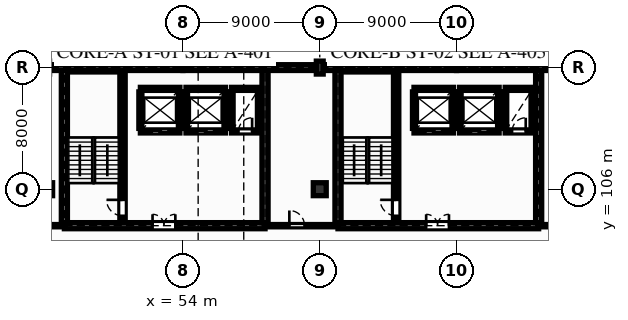
"""IFC4 building model, lengths in metres.
Left out: names, types, materials, properties, quantities, classifications, styles, units other than length and angle.
Written with IfcOpenShell. Run it as: python <this file> out.ifc"""

import sys

from ifc_helpers import new_model, si_unit, direction, frame, frame_2d, origin, origin_2d, place, context, subcontext, project, spatial, rectangle, extrude, element, fill, save


model = new_model("IFC4")
c1 = context("Model", 3, precision=1e-05, world=origin(), true_north=direction((0.0, 1.0)))
c2 = subcontext(c1, "Body", "Model", "MODEL_VIEW")
j1 = project(units=[si_unit("LENGTHUNIT", "METRE"), si_unit("PLANEANGLEUNIT", "RADIAN")], contexts=[c1])
p1 = place(None, origin())
s1 = spatial("IfcSite", under=j1, at=p1, CompositionType="ELEMENT")
p2 = place(p1, origin())
s2 = spatial("IfcBuilding", under=s1, at=p2, CompositionType="ELEMENT")
p3 = place(p2, frame((0.0, 0.0, 5.1)))
s3 = spatial("IfcBuildingStorey", under=s2, at=p3, CompositionType="ELEMENT", Elevation=5.1)
p4 = place(p3, frame((45.0, 106.0, 0.0), z_axis=(0.0, 0.0, 1.0), x_axis=(1.0, 0.0, 0.0)))
e1 = element("IfcColumn", 1, at=p4, inside=s3, PredefinedType="COLUMN", context=c2, shape_type="SweptSolid", body=[
    extrude(rectangle(XDim=0.85, YDim=0.85, at=origin_2d()), origin(), (0.0, 0.0, 1.0), 3.84),
])
p5 = place(p3, frame((45.0, 114.0, 0.0), z_axis=(0.0, 0.0, 1.0), x_axis=(0.0, 1.0, 0.0)))
e2 = element("IfcColumn", 2, at=p5, inside=s3, PredefinedType="COLUMN", context=c2, shape_type="SweptSolid", body=[
    extrude(rectangle(XDim=0.45, YDim=0.85, at=origin_2d()), origin(), (0.0, 0.0, 1.0), 3.84),
])
p6 = place(p3, frame((63.0, 106.0, 0.0), z_axis=(0.0, 0.0, 1.0), x_axis=(1.0, 0.0, 0.0)))
e3 = element("IfcColumn", 3, at=p6, inside=s3, PredefinedType="COLUMN", context=c2, shape_type="SweptSolid", body=[
    extrude(rectangle(XDim=0.85, YDim=0.85, at=origin_2d()), origin(), (0.0, 0.0, 1.0), 3.84),
])
p7 = place(p3, frame((63.0, 114.0, 0.0), z_axis=(0.0, 0.0, 1.0), x_axis=(0.0, 1.0, 0.0)))
e4 = element("IfcColumn", 4, at=p7, inside=s3, PredefinedType="COLUMN", context=c2, shape_type="SweptSolid", body=[
    extrude(rectangle(XDim=0.45, YDim=0.85, at=origin_2d()), origin(), (0.0, 0.0, 1.0), 3.84),
])
for number, where, z_axis, x_axis in (
    (5, (45.0, 114.0, 0.0), (0.0, 0.0, 1.0), (1.0, 0.0, 0.0)),
    (6, (54.0, 114.0, 0.0), (0.0, 0.0, 1.0), (1.0, 0.0, 0.0)),
    (7, (63.0, 114.0, 0.0), (0.0, 0.0, 1.0), (1.0, 0.0, 0.0)),
    (8, (72.0, 114.0, 0.0), (0.0, 0.0, 1.0), (1.0, 0.0, 0.0)),
):
    element("IfcWall", number, at=place(p3, frame(where, z_axis=z_axis, x_axis=x_axis)), inside=s3, PredefinedType="SOLIDWALL", context=c2, shape_type="SweptSolid", body=[
        extrude(rectangle(XDim=9.0, YDim=0.38, at=frame_2d((4.5, 0.0))), origin(), (0.0, 0.0, 1.0), 3.55),
    ])
p8 = place(p3, frame((46.2, 103.6, 0.0), z_axis=(0.0, 0.0, 1.0), x_axis=(1.0, 0.0, 0.0)))
e9 = element("IfcWall", 9, at=p8, inside=s3, PredefinedType="SHEAR", context=c2, shape_type="SweptSolid", body=[
    extrude(rectangle(XDim=13.2, YDim=0.4, at=frame_2d((6.6, 0.0))), origin(), (0.0, 0.0, 1.0), 3.55),
])
p9 = place(p8, frame((5.8, 0.0, 0.0)))
e10 = element("IfcOpeningElement", 10, at=p9, cuts=e9, PredefinedType="OPENING", context=c2, shape_type="SweptSolid", body=[
    extrude(rectangle(XDim=1.5, YDim=2.2, at=frame_2d((0.75, 1.1))), frame((0.0, 0.21, 0.0), z_axis=(0.0, -1.0, 0.0), x_axis=(1.0, 0.0, 0.0)), (0.0, 0.0, 1.0), 0.42),
])
for number, where, z_axis, x_axis in (
    (11, (46.2, 103.8, 0.0), (0.0, 0.0, 1.0), (0.0, 1.0, 0.0)),
    (12, (59.4, 103.8, 0.0), (0.0, 0.0, 1.0), (0.0, 1.0, 0.0)),
):
    element("IfcWall", number, at=place(p3, frame(where, z_axis=z_axis, x_axis=x_axis)), inside=s3, PredefinedType="SHEAR", context=c2, shape_type="SweptSolid", body=[
        extrude(rectangle(XDim=10.01, YDim=0.4, at=frame_2d((5.005, 0.0))), origin(), (0.0, 0.0, 1.0), 3.55),
    ])
p10 = place(p3, frame((50.025, 103.8, 0.0), z_axis=(0.0, 0.0, 1.0), x_axis=(0.0, 1.0, 0.0)))
e13 = element("IfcWall", 13, at=p10, inside=s3, PredefinedType="SHEAR", context=c2, shape_type="SweptSolid", body=[
    extrude(rectangle(XDim=10.01, YDim=0.35, at=frame_2d((5.005, 0.0))), origin(), (0.0, 0.0, 1.0), 3.55),
])
p11 = place(p10, frame((0.45, 0.0, 0.0)))
e14 = element("IfcOpeningElement", 14, at=p11, cuts=e13, PredefinedType="OPENING", context=c2, shape_type="SweptSolid", body=[
    extrude(rectangle(XDim=1.05, YDim=2.2, at=frame_2d((0.525, 1.1))), frame((0.0, 0.185, 0.0), z_axis=(0.0, -1.0, 0.0), x_axis=(1.0, 0.0, 0.0)), (0.0, 0.0, 1.0), 0.37),
])
p12 = place(p3, frame((51.2, 109.8, 0.0), z_axis=(0.0, 0.0, 1.0), x_axis=(1.0, 0.0, 0.0)))
e15 = element("IfcWall", 15, at=p12, inside=s3, PredefinedType="PARTITIONING", context=c2, shape_type="SweptSolid", body=[
    extrude(rectangle(XDim=2.6, YDim=0.2, at=frame_2d((1.3, 0.0))), origin(), (0.0, 0.0, 1.0), 3.55),
])
p13 = place(p12, frame((0.75, 0.0, 0.0)))
e16 = element("IfcOpeningElement", 16, at=p13, cuts=e15, PredefinedType="OPENING", context=c2, shape_type="SweptSolid", body=[
    extrude(rectangle(XDim=1.1, YDim=2.15, at=frame_2d((0.55, 1.075))), frame((0.0, 0.11, 0.0), z_axis=(0.0, -1.0, 0.0), x_axis=(1.0, 0.0, 0.0)), (0.0, 0.0, 1.0), 0.22),
])
p14 = place(p3, frame((51.2, 112.6, 0.0), z_axis=(0.0, 0.0, 1.0), x_axis=(1.0, 0.0, 0.0)))
e17 = element("IfcWall", 17, at=p14, inside=s3, PredefinedType="PARTITIONING", context=c2, shape_type="SweptSolid", body=[
    extrude(rectangle(XDim=2.6, YDim=0.2, at=frame_2d((1.3, 0.0))), origin(), (0.0, 0.0, 1.0), 3.55),
])
for number, where, z_axis, x_axis in (
    (18, (51.2, 110.0, 0.0), (0.0, 0.0, 1.0), (0.0, 1.0, 0.0)),
    (19, (53.8, 110.0, 0.0), (0.0, 0.0, 1.0), (0.0, 1.0, 0.0)),
):
    element("IfcWall", number, at=place(p3, frame(where, z_axis=z_axis, x_axis=x_axis)), inside=s3, PredefinedType="PARTITIONING", context=c2, shape_type="SweptSolid", body=[
        extrude(rectangle(XDim=2.4, YDim=0.2, at=frame_2d((1.2, 0.0))), origin(), (0.0, 0.0, 1.0), 3.55),
    ])
p15 = place(p3, frame((54.2, 109.8, 0.0), z_axis=(0.0, 0.0, 1.0), x_axis=(1.0, 0.0, 0.0)))
e20 = element("IfcWall", 20, at=p15, inside=s3, PredefinedType="PARTITIONING", context=c2, shape_type="SweptSolid", body=[
    extrude(rectangle(XDim=2.6, YDim=0.2, at=frame_2d((1.3, 0.0))), origin(), (0.0, 0.0, 1.0), 3.55),
])
p16 = place(p15, frame((0.75, 0.0, 0.0)))
e21 = element("IfcOpeningElement", 21, at=p16, cuts=e20, PredefinedType="OPENING", context=c2, shape_type="SweptSolid", body=[
    extrude(rectangle(XDim=1.1, YDim=2.15, at=frame_2d((0.55, 1.075))), frame((0.0, 0.11, 0.0), z_axis=(0.0, -1.0, 0.0), x_axis=(1.0, 0.0, 0.0)), (0.0, 0.0, 1.0), 0.22),
])
p17 = place(p3, frame((54.2, 112.6, 0.0), z_axis=(0.0, 0.0, 1.0), x_axis=(1.0, 0.0, 0.0)))
e22 = element("IfcWall", 22, at=p17, inside=s3, PredefinedType="PARTITIONING", context=c2, shape_type="SweptSolid", body=[
    extrude(rectangle(XDim=2.6, YDim=0.2, at=frame_2d((1.3, 0.0))), origin(), (0.0, 0.0, 1.0), 3.55),
])
for number, where, z_axis, x_axis in (
    (23, (54.2, 110.0, 0.0), (0.0, 0.0, 1.0), (0.0, 1.0, 0.0)),
    (24, (56.8, 110.0, 0.0), (0.0, 0.0, 1.0), (0.0, 1.0, 0.0)),
):
    element("IfcWall", number, at=place(p3, frame(where, z_axis=z_axis, x_axis=x_axis)), inside=s3, PredefinedType="PARTITIONING", context=c2, shape_type="SweptSolid", body=[
        extrude(rectangle(XDim=2.4, YDim=0.2, at=frame_2d((1.2, 0.0))), origin(), (0.0, 0.0, 1.0), 3.55),
    ])
p18 = place(p3, frame((57.2, 109.8, 0.0), z_axis=(0.0, 0.0, 1.0), x_axis=(1.0, 0.0, 0.0)))
e25 = element("IfcWall", 25, at=p18, inside=s3, PredefinedType="PARTITIONING", context=c2, shape_type="SweptSolid", body=[
    extrude(rectangle(XDim=1.8, YDim=0.2, at=frame_2d((0.9, 0.0))), origin(), (0.0, 0.0, 1.0), 3.55),
])
p19 = place(p18, frame((0.45, 0.0, 0.0)))
e26 = element("IfcOpeningElement", 26, at=p19, cuts=e25, PredefinedType="OPENING", context=c2, shape_type="SweptSolid", body=[
    extrude(rectangle(XDim=0.9, YDim=2.1, at=frame_2d((0.45, 1.05))), frame((0.0, 0.11, 0.0), z_axis=(0.0, -1.0, 0.0), x_axis=(1.0, 0.0, 0.0)), (0.0, 0.0, 1.0), 0.22),
])
p20 = place(p3, frame((57.2, 112.6, 0.0), z_axis=(0.0, 0.0, 1.0), x_axis=(1.0, 0.0, 0.0)))
e27 = element("IfcWall", 27, at=p20, inside=s3, PredefinedType="PARTITIONING", context=c2, shape_type="SweptSolid", body=[
    extrude(rectangle(XDim=1.8, YDim=0.2, at=frame_2d((0.9, 0.0))), origin(), (0.0, 0.0, 1.0), 3.55),
])
for number, where, z_axis, x_axis in (
    (28, (57.2, 110.0, 0.0), (0.0, 0.0, 1.0), (0.0, 1.0, 0.0)),
    (29, (59.0, 110.0, 0.0), (0.0, 0.0, 1.0), (0.0, 1.0, 0.0)),
):
    element("IfcWall", number, at=place(p3, frame(where, z_axis=z_axis, x_axis=x_axis)), inside=s3, PredefinedType="PARTITIONING", context=c2, shape_type="SweptSolid", body=[
        extrude(rectangle(XDim=2.4, YDim=0.2, at=frame_2d((1.2, 0.0))), origin(), (0.0, 0.0, 1.0), 3.55),
    ])
p21 = place(p3, frame((64.2, 103.6, 0.0), z_axis=(0.0, 0.0, 1.0), x_axis=(1.0, 0.0, 0.0)))
e30 = element("IfcWall", 30, at=p21, inside=s3, PredefinedType="SHEAR", context=c2, shape_type="SweptSolid", body=[
    extrude(rectangle(XDim=13.2, YDim=0.4, at=frame_2d((6.6, 0.0))), origin(), (0.0, 0.0, 1.0), 3.55),
])
p22 = place(p21, frame((5.8, 0.0, 0.0)))
e31 = element("IfcOpeningElement", 31, at=p22, cuts=e30, PredefinedType="OPENING", context=c2, shape_type="SweptSolid", body=[
    extrude(rectangle(XDim=1.5, YDim=2.2, at=frame_2d((0.75, 1.1))), frame((0.0, 0.21, 0.0), z_axis=(0.0, -1.0, 0.0), x_axis=(1.0, 0.0, 0.0)), (0.0, 0.0, 1.0), 0.42),
])
for number, where, z_axis, x_axis in (
    (32, (64.2, 103.8, 0.0), (0.0, 0.0, 1.0), (0.0, 1.0, 0.0)),
    (33, (77.4, 103.8, 0.0), (0.0, 0.0, 1.0), (0.0, 1.0, 0.0)),
):
    element("IfcWall", number, at=place(p3, frame(where, z_axis=z_axis, x_axis=x_axis)), inside=s3, PredefinedType="SHEAR", context=c2, shape_type="SweptSolid", body=[
        extrude(rectangle(XDim=10.01, YDim=0.4, at=frame_2d((5.005, 0.0))), origin(), (0.0, 0.0, 1.0), 3.55),
    ])
p23 = place(p3, frame((68.025, 103.8, 0.0), z_axis=(0.0, 0.0, 1.0), x_axis=(0.0, 1.0, 0.0)))
e34 = element("IfcWall", 34, at=p23, inside=s3, PredefinedType="SHEAR", context=c2, shape_type="SweptSolid", body=[
    extrude(rectangle(XDim=10.01, YDim=0.35, at=frame_2d((5.005, 0.0))), origin(), (0.0, 0.0, 1.0), 3.55),
])
p24 = place(p23, frame((0.45, 0.0, 0.0)))
e35 = element("IfcOpeningElement", 35, at=p24, cuts=e34, PredefinedType="OPENING", context=c2, shape_type="SweptSolid", body=[
    extrude(rectangle(XDim=1.05, YDim=2.2, at=frame_2d((0.525, 1.1))), frame((0.0, 0.185, 0.0), z_axis=(0.0, -1.0, 0.0), x_axis=(1.0, 0.0, 0.0)), (0.0, 0.0, 1.0), 0.37),
])
p25 = place(p3, frame((69.2, 109.8, 0.0), z_axis=(0.0, 0.0, 1.0), x_axis=(1.0, 0.0, 0.0)))
e36 = element("IfcWall", 36, at=p25, inside=s3, PredefinedType="PARTITIONING", context=c2, shape_type="SweptSolid", body=[
    extrude(rectangle(XDim=2.6, YDim=0.2, at=frame_2d((1.3, 0.0))), origin(), (0.0, 0.0, 1.0), 3.55),
])
p26 = place(p25, frame((0.75, 0.0, 0.0)))
e37 = element("IfcOpeningElement", 37, at=p26, cuts=e36, PredefinedType="OPENING", context=c2, shape_type="SweptSolid", body=[
    extrude(rectangle(XDim=1.1, YDim=2.15, at=frame_2d((0.55, 1.075))), frame((0.0, 0.11, 0.0), z_axis=(0.0, -1.0, 0.0), x_axis=(1.0, 0.0, 0.0)), (0.0, 0.0, 1.0), 0.22),
])
p27 = place(p3, frame((69.2, 112.6, 0.0), z_axis=(0.0, 0.0, 1.0), x_axis=(1.0, 0.0, 0.0)))
e38 = element("IfcWall", 38, at=p27, inside=s3, PredefinedType="PARTITIONING", context=c2, shape_type="SweptSolid", body=[
    extrude(rectangle(XDim=2.6, YDim=0.2, at=frame_2d((1.3, 0.0))), origin(), (0.0, 0.0, 1.0), 3.55),
])
for number, where, z_axis, x_axis in (
    (39, (69.2, 110.0, 0.0), (0.0, 0.0, 1.0), (0.0, 1.0, 0.0)),
    (40, (71.8, 110.0, 0.0), (0.0, 0.0, 1.0), (0.0, 1.0, 0.0)),
):
    element("IfcWall", number, at=place(p3, frame(where, z_axis=z_axis, x_axis=x_axis)), inside=s3, PredefinedType="PARTITIONING", context=c2, shape_type="SweptSolid", body=[
        extrude(rectangle(XDim=2.4, YDim=0.2, at=frame_2d((1.2, 0.0))), origin(), (0.0, 0.0, 1.0), 3.55),
    ])
p28 = place(p3, frame((72.2, 109.8, 0.0), z_axis=(0.0, 0.0, 1.0), x_axis=(1.0, 0.0, 0.0)))
e41 = element("IfcWall", 41, at=p28, inside=s3, PredefinedType="PARTITIONING", context=c2, shape_type="SweptSolid", body=[
    extrude(rectangle(XDim=2.6, YDim=0.2, at=frame_2d((1.3, 0.0))), origin(), (0.0, 0.0, 1.0), 3.55),
])
p29 = place(p28, frame((0.75, 0.0, 0.0)))
e42 = element("IfcOpeningElement", 42, at=p29, cuts=e41, PredefinedType="OPENING", context=c2, shape_type="SweptSolid", body=[
    extrude(rectangle(XDim=1.1, YDim=2.15, at=frame_2d((0.55, 1.075))), frame((0.0, 0.11, 0.0), z_axis=(0.0, -1.0, 0.0), x_axis=(1.0, 0.0, 0.0)), (0.0, 0.0, 1.0), 0.22),
])
p30 = place(p3, frame((72.2, 112.6, 0.0), z_axis=(0.0, 0.0, 1.0), x_axis=(1.0, 0.0, 0.0)))
e43 = element("IfcWall", 43, at=p30, inside=s3, PredefinedType="PARTITIONING", context=c2, shape_type="SweptSolid", body=[
    extrude(rectangle(XDim=2.6, YDim=0.2, at=frame_2d((1.3, 0.0))), origin(), (0.0, 0.0, 1.0), 3.55),
])
for number, where, z_axis, x_axis in (
    (44, (72.2, 110.0, 0.0), (0.0, 0.0, 1.0), (0.0, 1.0, 0.0)),
    (45, (74.8, 110.0, 0.0), (0.0, 0.0, 1.0), (0.0, 1.0, 0.0)),
):
    element("IfcWall", number, at=place(p3, frame(where, z_axis=z_axis, x_axis=x_axis)), inside=s3, PredefinedType="PARTITIONING", context=c2, shape_type="SweptSolid", body=[
        extrude(rectangle(XDim=2.4, YDim=0.2, at=frame_2d((1.2, 0.0))), origin(), (0.0, 0.0, 1.0), 3.55),
    ])
p31 = place(p3, frame((75.2, 109.8, 0.0), z_axis=(0.0, 0.0, 1.0), x_axis=(1.0, 0.0, 0.0)))
e46 = element("IfcWall", 46, at=p31, inside=s3, PredefinedType="PARTITIONING", context=c2, shape_type="SweptSolid", body=[
    extrude(rectangle(XDim=1.8, YDim=0.2, at=frame_2d((0.9, 0.0))), origin(), (0.0, 0.0, 1.0), 3.55),
])
p32 = place(p31, frame((0.45, 0.0, 0.0)))
e47 = element("IfcOpeningElement", 47, at=p32, cuts=e46, PredefinedType="OPENING", context=c2, shape_type="SweptSolid", body=[
    extrude(rectangle(XDim=0.9, YDim=2.1, at=frame_2d((0.45, 1.05))), frame((0.0, 0.11, 0.0), z_axis=(0.0, -1.0, 0.0), x_axis=(1.0, 0.0, 0.0)), (0.0, 0.0, 1.0), 0.22),
])
p33 = place(p3, frame((75.2, 112.6, 0.0), z_axis=(0.0, 0.0, 1.0), x_axis=(1.0, 0.0, 0.0)))
e48 = element("IfcWall", 48, at=p33, inside=s3, PredefinedType="PARTITIONING", context=c2, shape_type="SweptSolid", body=[
    extrude(rectangle(XDim=1.8, YDim=0.2, at=frame_2d((0.9, 0.0))), origin(), (0.0, 0.0, 1.0), 3.55),
])
for number, where, z_axis, x_axis in (
    (49, (75.2, 110.0, 0.0), (0.0, 0.0, 1.0), (0.0, 1.0, 0.0)),
    (50, (77.0, 110.0, 0.0), (0.0, 0.0, 1.0), (0.0, 1.0, 0.0)),
):
    element("IfcWall", number, at=place(p3, frame(where, z_axis=z_axis, x_axis=x_axis)), inside=s3, PredefinedType="PARTITIONING", context=c2, shape_type="SweptSolid", body=[
        extrude(rectangle(XDim=2.4, YDim=0.2, at=frame_2d((1.2, 0.0))), origin(), (0.0, 0.0, 1.0), 3.55),
    ])
p34 = place(p3, frame((36.0, 103.6, 0.0), z_axis=(0.0, 0.0, 1.0), x_axis=(1.0, 0.0, 0.0)))
e51 = element("IfcWall", 51, at=p34, inside=s3, PredefinedType="PARTITIONING", context=c2, shape_type="SweptSolid", body=[
    extrude(rectangle(XDim=10.2, YDim=0.15, at=frame_2d((5.1, 0.0))), origin(), (0.0, 0.0, 1.0), 3.55),
])
p35 = place(p34, frame((4.4, 0.0, 0.0)))
e52 = element("IfcOpeningElement", 52, at=p35, cuts=e51, PredefinedType="OPENING", context=c2, shape_type="SweptSolid", body=[
    extrude(rectangle(XDim=1.0, YDim=2.15, at=frame_2d((0.5, 1.075))), frame((0.0, 0.085, 0.0), z_axis=(0.0, -1.0, 0.0), x_axis=(1.0, 0.0, 0.0)), (0.0, 0.0, 1.0), 0.17),
])
p36 = place(p3, frame((59.4, 103.6, 0.0), z_axis=(0.0, 0.0, 1.0), x_axis=(1.0, 0.0, 0.0)))
e53 = element("IfcWall", 53, at=p36, inside=s3, PredefinedType="PARTITIONING", context=c2, shape_type="SweptSolid", body=[
    extrude(rectangle(XDim=4.8, YDim=0.15, at=frame_2d((2.4, 0.0))), origin(), (0.0, 0.0, 1.0), 3.55),
])
p37 = place(p36, frame((1.6, 0.0, 0.0)))
e54 = element("IfcOpeningElement", 54, at=p37, cuts=e53, PredefinedType="OPENING", context=c2, shape_type="SweptSolid", body=[
    extrude(rectangle(XDim=1.0, YDim=2.15, at=frame_2d((0.5, 1.075))), frame((0.0, 0.085, 0.0), z_axis=(0.0, -1.0, 0.0), x_axis=(1.0, 0.0, 0.0)), (0.0, 0.0, 1.0), 0.17),
])
p38 = place(p3, frame((77.4, 103.6, 0.0), z_axis=(0.0, 0.0, 1.0), x_axis=(1.0, 0.0, 0.0)))
e55 = element("IfcWall", 55, at=p38, inside=s3, PredefinedType="PARTITIONING", context=c2, shape_type="SweptSolid", body=[
    extrude(rectangle(XDim=30.6, YDim=0.15, at=frame_2d((15.3, 0.0))), origin(), (0.0, 0.0, 1.0), 3.55),
])
p39 = place(p38, frame((14.6, 0.0, 0.0)))
e56 = element("IfcOpeningElement", 56, at=p39, cuts=e55, PredefinedType="OPENING", context=c2, shape_type="SweptSolid", body=[
    extrude(rectangle(XDim=1.0, YDim=2.15, at=frame_2d((0.5, 1.075))), frame((0.0, 0.085, 0.0), z_axis=(0.0, -1.0, 0.0), x_axis=(1.0, 0.0, 0.0)), (0.0, 0.0, 1.0), 0.17),
])
p40 = place(p9, origin())
e57 = element("IfcDoor", 57, at=p40, inside=s3, OperationType="DOUBLE_DOOR_SINGLE_SWING", PredefinedType="DOOR", context=c2, shape_type="SweptSolid", body=[
    extrude(rectangle(XDim=1.5, YDim=2.2, at=frame_2d((0.75, 1.1))), frame((0.0, 0.025, 0.0), z_axis=(0.0, -1.0, 0.0), x_axis=(1.0, 0.0, 0.0)), (0.0, 0.0, 1.0), 0.05),
])
fill(e10, e57)
p41 = place(p11, origin())
e58 = element("IfcDoor", 58, at=p41, inside=s3, OperationType="SINGLE_SWING_RIGHT", PredefinedType="DOOR", context=c2, shape_type="SweptSolid", body=[
    extrude(rectangle(XDim=1.05, YDim=2.2, at=frame_2d((0.525, 1.1))), frame((0.0, 0.025, 0.0), z_axis=(0.0, -1.0, 0.0), x_axis=(1.0, 0.0, 0.0)), (0.0, 0.0, 1.0), 0.05),
])
fill(e14, e58)
p42 = place(p13, origin())
e59 = element("IfcDoor", 59, at=p42, inside=s3, OperationType="SLIDING_TO_LEFT", PredefinedType="DOOR", context=c2, shape_type="SweptSolid", body=[
    extrude(rectangle(XDim=1.1, YDim=2.15, at=frame_2d((0.55, 1.075))), frame((0.0, 0.025, 0.0), z_axis=(0.0, -1.0, 0.0), x_axis=(1.0, 0.0, 0.0)), (0.0, 0.0, 1.0), 0.05),
])
fill(e16, e59)
p43 = place(p16, origin())
e60 = element("IfcDoor", 60, at=p43, inside=s3, OperationType="SLIDING_TO_RIGHT", PredefinedType="DOOR", context=c2, shape_type="SweptSolid", body=[
    extrude(rectangle(XDim=1.1, YDim=2.15, at=frame_2d((0.55, 1.075))), frame((0.0, 0.025, 0.0), z_axis=(0.0, -1.0, 0.0), x_axis=(1.0, 0.0, 0.0)), (0.0, 0.0, 1.0), 0.05),
])
fill(e21, e60)
p44 = place(p19, origin())
e61 = element("IfcDoor", 61, at=p44, inside=s3, OperationType="SINGLE_SWING_RIGHT", PredefinedType="DOOR", context=c2, shape_type="SweptSolid", body=[
    extrude(rectangle(XDim=0.9, YDim=2.1, at=frame_2d((0.45, 1.05))), frame((0.0, 0.025, 0.0), z_axis=(0.0, -1.0, 0.0), x_axis=(1.0, 0.0, 0.0)), (0.0, 0.0, 1.0), 0.05),
])
fill(e26, e61)
p45 = place(p22, origin())
e62 = element("IfcDoor", 62, at=p45, inside=s3, OperationType="DOUBLE_DOOR_SINGLE_SWING", PredefinedType="DOOR", context=c2, shape_type="SweptSolid", body=[
    extrude(rectangle(XDim=1.5, YDim=2.2, at=frame_2d((0.75, 1.1))), frame((0.0, 0.025, 0.0), z_axis=(0.0, -1.0, 0.0), x_axis=(1.0, 0.0, 0.0)), (0.0, 0.0, 1.0), 0.05),
])
fill(e31, e62)
p46 = place(p24, origin())
e63 = element("IfcDoor", 63, at=p46, inside=s3, OperationType="SINGLE_SWING_RIGHT", PredefinedType="DOOR", context=c2, shape_type="SweptSolid", body=[
    extrude(rectangle(XDim=1.05, YDim=2.2, at=frame_2d((0.525, 1.1))), frame((0.0, 0.025, 0.0), z_axis=(0.0, -1.0, 0.0), x_axis=(1.0, 0.0, 0.0)), (0.0, 0.0, 1.0), 0.05),
])
fill(e35, e63)
p47 = place(p26, origin())
e64 = element("IfcDoor", 64, at=p47, inside=s3, OperationType="SLIDING_TO_LEFT", PredefinedType="DOOR", context=c2, shape_type="SweptSolid", body=[
    extrude(rectangle(XDim=1.1, YDim=2.15, at=frame_2d((0.55, 1.075))), frame((0.0, 0.025, 0.0), z_axis=(0.0, -1.0, 0.0), x_axis=(1.0, 0.0, 0.0)), (0.0, 0.0, 1.0), 0.05),
])
fill(e37, e64)
p48 = place(p29, origin())
e65 = element("IfcDoor", 65, at=p48, inside=s3, OperationType="SLIDING_TO_RIGHT", PredefinedType="DOOR", context=c2, shape_type="SweptSolid", body=[
    extrude(rectangle(XDim=1.1, YDim=2.15, at=frame_2d((0.55, 1.075))), frame((0.0, 0.025, 0.0), z_axis=(0.0, -1.0, 0.0), x_axis=(1.0, 0.0, 0.0)), (0.0, 0.0, 1.0), 0.05),
])
fill(e42, e65)
p49 = place(p32, origin())
e66 = element("IfcDoor", 66, at=p49, inside=s3, OperationType="SINGLE_SWING_RIGHT", PredefinedType="DOOR", context=c2, shape_type="SweptSolid", body=[
    extrude(rectangle(XDim=0.9, YDim=2.1, at=frame_2d((0.45, 1.05))), frame((0.0, 0.025, 0.0), z_axis=(0.0, -1.0, 0.0), x_axis=(1.0, 0.0, 0.0)), (0.0, 0.0, 1.0), 0.05),
])
fill(e47, e66)
p50 = place(p37, origin())
e67 = element("IfcDoor", 67, at=p50, inside=s3, OperationType="SINGLE_SWING_LEFT", PredefinedType="DOOR", context=c2, shape_type="SweptSolid", body=[
    extrude(rectangle(XDim=1.0, YDim=2.15, at=frame_2d((0.5, 1.075))), frame((0.0, 0.025, 0.0), z_axis=(0.0, -1.0, 0.0), x_axis=(1.0, 0.0, 0.0)), (0.0, 0.0, 1.0), 0.05),
])
fill(e54, e67)
save(model, sys.argv[1])
